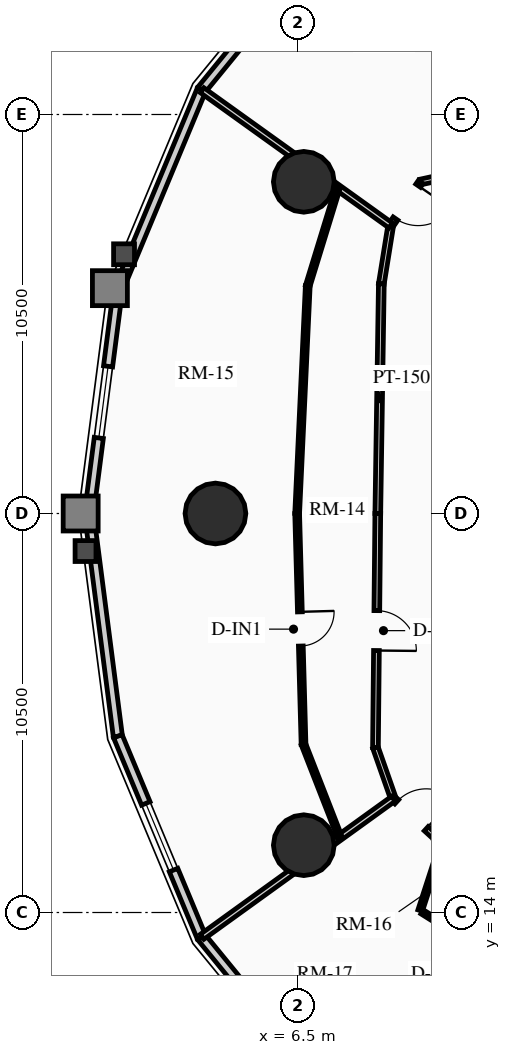
"""IFC4 building model, lengths in metres.
Left out: names, types, materials, properties, quantities, classifications, styles, units other than length and angle.
Written with IfcOpenShell. Run it as: python <this file> out.ifc"""

import sys

from ifc_helpers import new_model, si_unit, direction, frame, frame_2d, origin, origin_2d, place, context, subcontext, project, spatial, rectangle, circle, extrude, source, transform, mapped, element, fill, save


model = new_model("IFC4")
c1 = context("Model", 3, precision=1e-05, world=origin(), true_north=direction((0.0, 1.0)))
c2 = subcontext(c1, "Body", "Model", "MODEL_VIEW")
j1 = project(units=[si_unit("LENGTHUNIT", "METRE"), si_unit("PLANEANGLEUNIT", "RADIAN")], contexts=[c1])
p1 = place(None, origin())
s1 = spatial("IfcSite", under=j1, at=p1, CompositionType="ELEMENT")
p2 = place(p1, origin())
s2 = spatial("IfcBuilding", under=s1, at=p2, CompositionType="ELEMENT")
p3 = place(p2, frame((0.0, 0.0, 39.46)))
s3 = spatial("IfcBuildingStorey", under=s2, at=p3, CompositionType="ELEMENT", Elevation=39.46)
for number, where, z_axis, x_axis in (
    (1, (6.653, 33.229, 0.0), (0.0, 0.0, 1.0), (1.0, 0.0, 0.0)),
    (2, (4.328, 24.5, 0.0), (0.0, 0.0, 1.0), (1.0, 0.0, 0.0)),
    (3, (6.653, 15.771, 0.0), (0.0, 0.0, 1.0), (1.0, 0.0, 0.0)),
):
    element("IfcColumn", number, at=place(p3, frame(where, z_axis=z_axis, x_axis=x_axis)), inside=s3, PredefinedType="USERDEFINED", context=c2, shape_type="SweptSolid", body=[
        extrude(circle(Radius=0.8, at=origin_2d()), origin(), (0.0, 0.0, 1.0), 2.91),
    ])
p4 = place(p3, frame((3.961, 35.65, 0.0), z_axis=(0.0, 0.0, 1.0), x_axis=(0.632710215588, 0.774388651189, 0.0)))
e4 = element("IfcWall", 4, at=p4, inside=s3, PredefinedType="SOLIDWALL", context=c2, shape_type="SweptSolid", body=[
    extrude(rectangle(XDim=5.419, YDim=0.24, at=frame_2d((2.71, 0.0))), origin(), (0.0, 0.0, 1.0), 2.073),
])
m1 = source(origin(), c2, "Body", "SweptSolid", [
    extrude(rectangle(XDim=2.2, YDim=1.35, at=frame_2d((1.1, 0.675))), frame((0.0, 0.13, 0.0), z_axis=(0.0, -1.0, 0.0), x_axis=(1.0, 0.0, 0.0)), (0.0, 0.0, 1.0), 0.26),
])
p5 = place(p4, frame((1.61, 0.0, 0.65)))
e5 = element("IfcOpeningElement", 5, at=p5, cuts=e4, PredefinedType="OPENING", context=c2, shape_type="MappedRepresentation", body=[
    mapped(m1, transform((0.0, 0.0, 0.0), x_axis=(1.0, 0.0, 0.0), y_axis=(0.0, 1.0, 0.0), z_axis=(0.0, 0.0, 1.0), scale=1.0)),
])
p6 = place(p3, frame((1.76, 30.362, 0.0), z_axis=(0.0, 0.0, 1.0), x_axis=(0.38430970593, 0.923204229804, 0.0)))
e6 = element("IfcWall", 6, at=p6, inside=s3, PredefinedType="SOLIDWALL", context=c2, shape_type="SweptSolid", body=[
    extrude(rectangle(XDim=5.728, YDim=0.24, at=frame_2d((2.864, 0.0))), origin(), (0.0, 0.0, 1.0), 2.073),
])
p7 = place(p3, frame((1.001, 24.5, 0.0), z_axis=(0.0, 0.0, 1.0), x_axis=(0.128329107357, 0.991731637191, 0.0)))
e7 = element("IfcWall", 7, at=p7, inside=s3, PredefinedType="SOLIDWALL", context=c2, shape_type="SweptSolid", body=[
    extrude(rectangle(XDim=5.911, YDim=0.24, at=frame_2d((2.956, 0.0))), origin(), (0.0, 0.0, 1.0), 2.073),
])
m2 = source(origin(), c2, "Body", "SweptSolid", [
    extrude(rectangle(XDim=1.9, YDim=1.35, at=frame_2d((0.95, 0.675))), frame((0.0, 0.13, 0.0), z_axis=(0.0, -1.0, 0.0), x_axis=(1.0, 0.0, 0.0)), (0.0, 0.0, 1.0), 0.26),
])
p8 = place(p7, frame((2.005, 0.0, 0.65)))
e8 = element("IfcOpeningElement", 8, at=p8, cuts=e7, PredefinedType="OPENING", context=c2, shape_type="MappedRepresentation", body=[
    mapped(m2, transform((0.0, 0.0, 0.0), x_axis=(1.0, 0.0, 0.0), y_axis=(0.0, 1.0, 0.0), z_axis=(0.0, 0.0, 1.0), scale=1.0)),
])
p9 = place(p3, frame((1.76, 18.638, 0.0), z_axis=(0.0, 0.0, 1.0), x_axis=(-0.128329107357, 0.991731637191, 0.0)))
e9 = element("IfcWall", 9, at=p9, inside=s3, PredefinedType="SOLIDWALL", context=c2, shape_type="SweptSolid", body=[
    extrude(rectangle(XDim=5.911, YDim=0.24, at=frame_2d((2.956, 0.0))), origin(), (0.0, 0.0, 1.0), 2.073),
])
p10 = place(p3, frame((3.961, 13.35, 0.0), z_axis=(0.0, 0.0, 1.0), x_axis=(-0.38430970593, 0.923204229804, 0.0)))
e10 = element("IfcWall", 10, at=p10, inside=s3, PredefinedType="SOLIDWALL", context=c2, shape_type="SweptSolid", body=[
    extrude(rectangle(XDim=5.728, YDim=0.24, at=frame_2d((2.864, 0.0))), origin(), (0.0, 0.0, 1.0), 2.073),
])
p11 = place(p10, frame((1.914, 0.0, 0.65)))
e11 = element("IfcOpeningElement", 11, at=p11, cuts=e10, PredefinedType="OPENING", context=c2, shape_type="MappedRepresentation", body=[
    mapped(m2, transform((0.0, 0.0, 0.0), x_axis=(1.0, 0.0, 0.0), y_axis=(0.0, 1.0, 0.0), z_axis=(0.0, 0.0, 1.0), scale=1.0)),
])
p12 = place(p3, frame((7.39, 9.153, 0.0), z_axis=(0.0, 0.0, 1.0), x_axis=(-0.632710215588, 0.774388651189, 0.0)))
e12 = element("IfcWall", 12, at=p12, inside=s3, PredefinedType="SOLIDWALL", context=c2, shape_type="SweptSolid", body=[
    extrude(rectangle(XDim=5.419, YDim=0.24, at=frame_2d((2.71, 0.0))), origin(), (0.0, 0.0, 1.0), 2.073),
])
p13 = place(p3, frame((11.62, 33.637, 0.0), z_axis=(0.0, 0.0, 1.0), x_axis=(-0.97702579435, -0.213121085711, 0.0)))
e13 = element("IfcWall", 13, at=p13, inside=s3, PredefinedType="PARTITIONING", context=c2, shape_type="SweptSolid", body=[
    extrude(rectangle(XDim=1.935, YDim=0.15, at=frame_2d((0.967, 0.0))), origin(), (0.0, 0.0, 1.0), 2.159),
])
p14 = place(p3, frame((9.729, 33.225, 0.0), z_axis=(0.0, 0.0, 1.0), x_axis=(-0.567183649484, -0.82359134755, 0.0)))
e14 = element("IfcWall", 14, at=p14, inside=s3, PredefinedType="PARTITIONING", context=c2, shape_type="SweptSolid", body=[
    extrude(rectangle(XDim=1.392, YDim=0.15, at=frame_2d((0.696, 0.0))), origin(), (0.0, 0.0, 1.0), 2.159),
])
m3 = source(origin(), c2, "Body", "SweptSolid", [
    extrude(rectangle(XDim=1.05, YDim=2.015, at=frame_2d((0.525, 1.007))), frame((0.0, 0.085, 0.0), z_axis=(0.0, -1.0, 0.0), x_axis=(1.0, 0.0, 0.0)), (0.0, 0.0, 1.0), 0.17),
])
p15 = place(p14, frame((0.12, 0.0, 0.0)))
e15 = element("IfcOpeningElement", 15, at=p15, cuts=e14, PredefinedType="OPENING", context=c2, shape_type="MappedRepresentation", body=[
    mapped(m3, transform((0.0, 0.0, 0.0), x_axis=(1.0, 0.0, 0.0), y_axis=(0.0, 1.0, 0.0), z_axis=(0.0, 0.0, 1.0), scale=1.0)),
])
p16 = place(p3, frame((8.94, 32.078, 0.0), z_axis=(0.0, 0.0, 1.0), x_axis=(-0.159148467753, -0.98725466077, 0.0)))
e16 = element("IfcWall", 16, at=p16, inside=s3, PredefinedType="PARTITIONING", context=c2, shape_type="SweptSolid", body=[
    extrude(rectangle(XDim=1.554, YDim=0.15, at=frame_2d((0.777, 0.0))), origin(), (0.0, 0.0, 1.0), 2.205),
])
p17 = place(p3, frame((8.693, 30.544, 0.0), z_axis=(0.0, 0.0, 1.0), x_axis=(-0.015307007986, -0.99988284089, 0.0)))
e17 = element("IfcWall", 17, at=p17, inside=s3, PredefinedType="PARTITIONING", context=c2, shape_type="SweptSolid", body=[
    extrude(rectangle(XDim=6.045, YDim=0.15, at=frame_2d((3.022, 0.0))), origin(), (0.0, 0.0, 1.0), 2.635),
])
p18 = place(p3, frame((8.6, 24.5, 0.0), z_axis=(0.0, 0.0, 1.0), x_axis=(-0.010023665349, -0.999949761805, 0.0)))
e18 = element("IfcWall", 18, at=p18, inside=s3, PredefinedType="PARTITIONING", context=c2, shape_type="SweptSolid", body=[
    extrude(rectangle(XDim=6.162, YDim=0.15, at=frame_2d((3.081, 0.0))), origin(), (0.0, 0.0, 1.0), 2.159),
])
p19 = place(p18, frame((2.556, 0.0, 0.0)))
e19 = element("IfcOpeningElement", 19, at=p19, cuts=e18, PredefinedType="OPENING", context=c2, shape_type="MappedRepresentation", body=[
    mapped(m3, transform((0.0, 0.0, 0.0), x_axis=(1.0, 0.0, 0.0), y_axis=(0.0, 1.0, 0.0), z_axis=(0.0, 0.0, 1.0), scale=1.0)),
])
p20 = place(p3, frame((8.538, 18.338, 0.0), z_axis=(0.0, 0.0, 1.0), x_axis=(0.331358150167, -0.94350504838, 0.0)))
e20 = element("IfcWall", 20, at=p20, inside=s3, PredefinedType="PARTITIONING", context=c2, shape_type="SweptSolid", body=[
    extrude(rectangle(XDim=1.424, YDim=0.15, at=frame_2d((0.712, 0.0))), origin(), (0.0, 0.0, 1.0), 2.205),
])
p21 = place(p3, frame((9.01, 16.994, 0.0), z_axis=(0.0, 0.0, 1.0), x_axis=(0.737701798986, -0.67512669609, 0.0)))
e21 = element("IfcWall", 21, at=p21, inside=s3, PredefinedType="PARTITIONING", context=c2, shape_type="SweptSolid", body=[
    extrude(rectangle(XDim=1.498, YDim=0.15, at=frame_2d((0.749, 0.0))), origin(), (0.0, 0.0, 1.0), 2.159),
])
p22 = place(p21, frame((0.12, 0.0, 0.0)))
e22 = element("IfcOpeningElement", 22, at=p22, cuts=e21, PredefinedType="OPENING", context=c2, shape_type="MappedRepresentation", body=[
    mapped(m3, transform((0.0, 0.0, 0.0), x_axis=(1.0, 0.0, 0.0), y_axis=(0.0, 1.0, 0.0), z_axis=(0.0, 0.0, 1.0), scale=1.0)),
])
p23 = place(p3, frame((8.94, 32.078, 0.0), z_axis=(0.0, 0.0, 1.0), x_axis=(-0.812546070691, 0.582896974606, 0.0)))
e23 = element("IfcWall", 23, at=p23, inside=s3, PredefinedType="PARTITIONING", context=c2, shape_type="SweptSolid", body=[
    extrude(rectangle(XDim=6.107, YDim=0.16, at=frame_2d((3.054, 0.0))), origin(), (0.0, 0.0, 1.0), 2.073),
])
p24 = place(p3, frame((9.01, 16.994, 0.0), z_axis=(0.0, 0.0, 1.0), x_axis=(-0.810839958558, -0.585267940012, 0.0)))
e24 = element("IfcWall", 24, at=p24, inside=s3, PredefinedType="PARTITIONING", context=c2, shape_type="SweptSolid", body=[
    extrude(rectangle(XDim=6.207, YDim=0.16, at=frame_2d((3.104, 0.0))), origin(), (0.0, 0.0, 1.0), 2.073),
])
p25 = place(p3, frame((7.55, 33.075, 0.0), z_axis=(0.0, 0.0, 1.0), x_axis=(-0.29356532185, -0.955939015736, 0.0)))
e25 = element("IfcWall", 25, at=p25, inside=s3, PredefinedType="PARTITIONING", context=c2, shape_type="SweptSolid", body=[
    extrude(rectangle(XDim=2.703, YDim=0.125, at=frame_2d((1.352, 0.0))), origin(), (0.0, 0.0, 1.0), 2.159),
])
p26 = place(p3, frame((6.757, 30.491, 0.0), z_axis=(0.0, 0.0, 1.0), x_axis=(-0.046524684881, -0.998917140556, 0.0)))
e26 = element("IfcWall", 26, at=p26, inside=s3, PredefinedType="PARTITIONING", context=c2, shape_type="SweptSolid", body=[
    extrude(rectangle(XDim=5.998, YDim=0.125, at=frame_2d((2.999, 0.0))), origin(), (0.0, 0.0, 1.0), 2.635),
])
p27 = place(p3, frame((6.478, 24.5, 0.0), z_axis=(0.0, 0.0, 1.0), x_axis=(0.027593153947, -0.999619236437, 0.0)))
e27 = element("IfcWall", 27, at=p27, inside=s3, PredefinedType="PARTITIONING", context=c2, shape_type="SweptSolid", body=[
    extrude(rectangle(XDim=6.078, YDim=0.125, at=frame_2d((3.039, 0.0))), origin(), (0.0, 0.0, 1.0), 2.159),
])
m4 = source(origin(), c2, "Body", "SweptSolid", [
    extrude(rectangle(XDim=0.9, YDim=2.005, at=frame_2d((0.45, 1.002))), frame((0.0, 0.073, 0.0), z_axis=(0.0, -1.0, 0.0), x_axis=(1.0, 0.0, 0.0)), (0.0, 0.0, 1.0), 0.145),
])
p28 = place(p27, frame((2.589, 0.0, 0.0)))
e28 = element("IfcOpeningElement", 28, at=p28, cuts=e27, PredefinedType="OPENING", context=c2, shape_type="MappedRepresentation", body=[
    mapped(m4, transform((0.0, 0.0, 0.0), x_axis=(1.0, 0.0, 0.0), y_axis=(0.0, 1.0, 0.0), z_axis=(0.0, 0.0, 1.0), scale=1.0)),
])
p29 = place(p3, frame((6.646, 18.424, 0.0), z_axis=(0.0, 0.0, 1.0), x_axis=(0.363782486735, -0.931483924899, 0.0)))
e29 = element("IfcWall", 29, at=p29, inside=s3, PredefinedType="PARTITIONING", context=c2, shape_type="SweptSolid", body=[
    extrude(rectangle(XDim=2.627, YDim=0.125, at=frame_2d((1.313, 0.0))), origin(), (0.0, 0.0, 1.0), 2.159),
])
p30 = place(p3, frame((10.235, 15.651, 0.0), z_axis=(0.0, 0.0, 1.0), x_axis=(-0.309082792716, -0.951035134602, 0.0)))
e30 = element("IfcWall", 30, at=p30, inside=s3, PredefinedType="PARTITIONING", context=c2, shape_type="SweptSolid", body=[
    extrude(rectangle(XDim=1.683, YDim=0.125, at=frame_2d((0.842, 0.0))), origin(), (0.0, 0.0, 1.0), 2.205),
])
p31 = place(p3, frame((9.767, 14.017, 0.0), z_axis=(0.0, 0.0, 1.0), x_axis=(0.846347510567, -0.532631102506, 0.0)))
e31 = element("IfcWall", 31, at=p31, inside=s3, PredefinedType="PARTITIONING", context=c2, shape_type="SweptSolid", body=[
    extrude(rectangle(XDim=1.991, YDim=0.125, at=frame_2d((0.995, 0.0))), origin(), (0.0, 0.0, 1.0), 2.635),
])
p32 = place(p31, frame((0.439, 0.0, 0.0)))
e32 = element("IfcOpeningElement", 32, at=p32, cuts=e31, PredefinedType="OPENING", context=c2, shape_type="MappedRepresentation", body=[
    mapped(m4, transform((0.0, 0.0, 0.0), x_axis=(1.0, 0.0, 0.0), y_axis=(0.0, 1.0, 0.0), z_axis=(0.0, 0.0, 1.0), scale=1.0)),
])
m5 = source(origin(), c2, "Body", "SweptSolid", [
    extrude(rectangle(XDim=1.9, YDim=1.35, at=frame_2d((0.95, 0.675))), frame((0.0, 0.03, 0.0), z_axis=(0.0, -1.0, 0.0), x_axis=(1.0, 0.0, 0.0)), (0.0, 0.0, 1.0), 0.06),
])
p33 = place(p8, origin())
e33 = element("IfcWindow", 33, at=p33, inside=s3, PartitioningType="DOUBLE_PANEL_VERTICAL", PredefinedType="WINDOW", context=c2, shape_type="MappedRepresentation", body=[
    mapped(m5, transform((0.0, 0.0, 0.0), x_axis=(1.0, 0.0, 0.0), y_axis=(0.0, 1.0, 0.0), z_axis=(0.0, 0.0, 1.0), scale=1.0)),
])
fill(e8, e33)
p34 = place(p11, origin())
e34 = element("IfcWindow", 34, at=p34, inside=s3, PartitioningType="DOUBLE_PANEL_VERTICAL", PredefinedType="WINDOW", context=c2, shape_type="MappedRepresentation", body=[
    mapped(m5, transform((0.0, 0.0, 0.0), x_axis=(1.0, 0.0, 0.0), y_axis=(0.0, 1.0, 0.0), z_axis=(0.0, 0.0, 1.0), scale=1.0)),
])
fill(e11, e34)
m6 = source(origin(), c2, "Body", "SweptSolid", [
    extrude(rectangle(XDim=1.05, YDim=2.015, at=frame_2d((0.525, 1.007))), frame((0.0, 0.025, 0.0), z_axis=(0.0, -1.0, 0.0), x_axis=(1.0, 0.0, 0.0)), (0.0, 0.0, 1.0), 0.05),
])
p35 = place(p15, origin())
e35 = element("IfcDoor", 35, at=p35, inside=s3, OperationType="SINGLE_SWING_LEFT", PredefinedType="DOOR", context=c2, shape_type="MappedRepresentation", body=[
    mapped(m6, transform((0.0, 0.0, 0.0), x_axis=(1.0, 0.0, 0.0), y_axis=(0.0, 1.0, 0.0), z_axis=(0.0, 0.0, 1.0), scale=1.0)),
])
fill(e15, e35)
p36 = place(p19, origin())
e36 = element("IfcDoor", 36, at=p36, inside=s3, OperationType="SINGLE_SWING_RIGHT", PredefinedType="DOOR", context=c2, shape_type="MappedRepresentation", body=[
    mapped(m6, transform((0.0, 0.0, 0.0), x_axis=(1.0, 0.0, 0.0), y_axis=(0.0, 1.0, 0.0), z_axis=(0.0, 0.0, 1.0), scale=1.0)),
])
fill(e19, e36)
m7 = source(origin(), c2, "Body", "SweptSolid", [
    extrude(rectangle(XDim=0.9, YDim=2.005, at=frame_2d((0.45, 1.002))), frame((0.0, 0.025, 0.0), z_axis=(0.0, -1.0, 0.0), x_axis=(1.0, 0.0, 0.0)), (0.0, 0.0, 1.0), 0.05),
])
p37 = place(p28, origin())
e37 = element("IfcDoor", 37, at=p37, inside=s3, OperationType="SINGLE_SWING_LEFT", PredefinedType="DOOR", context=c2, shape_type="MappedRepresentation", body=[
    mapped(m7, transform((0.0, 0.0, 0.0), x_axis=(1.0, 0.0, 0.0), y_axis=(0.0, 1.0, 0.0), z_axis=(0.0, 0.0, 1.0), scale=1.0)),
])
fill(e28, e37)
p38 = place(p22, origin())
e38 = element("IfcDoor", 38, at=p38, inside=s3, OperationType="SINGLE_SWING_RIGHT", PredefinedType="DOOR", context=c2, shape_type="MappedRepresentation", body=[
    mapped(m6, transform((0.0, 0.0, 0.0), x_axis=(1.0, 0.0, 0.0), y_axis=(0.0, 1.0, 0.0), z_axis=(0.0, 0.0, 1.0), scale=1.0)),
])
fill(e22, e38)
save(model, sys.argv[1])
